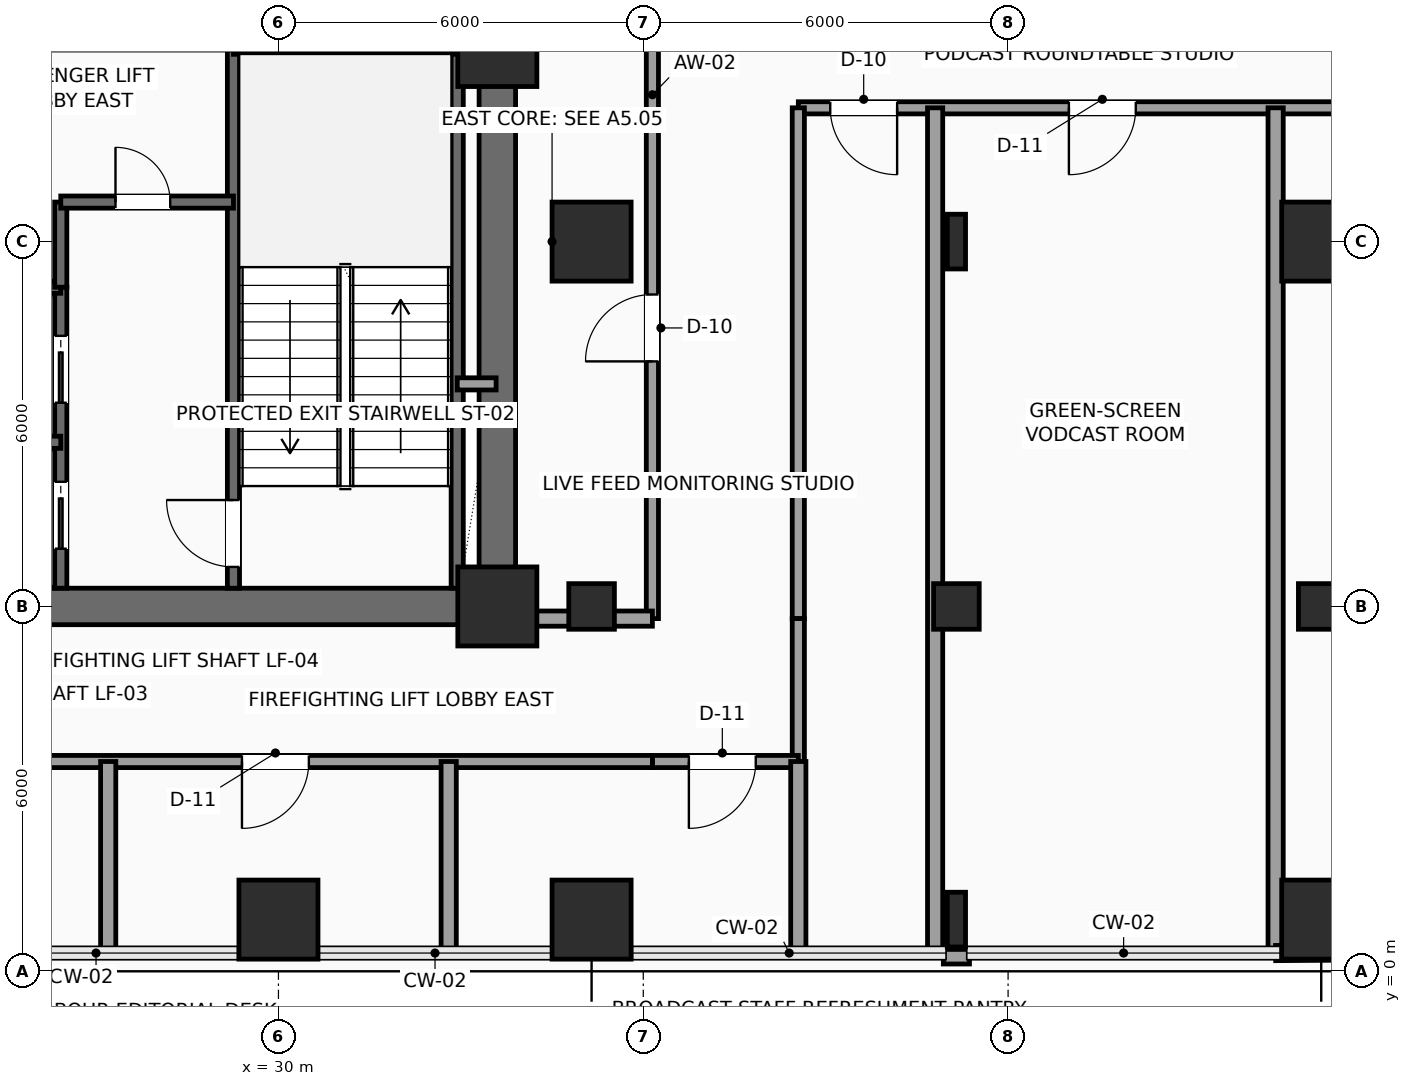
"""IFC4 building model, lengths in metres.
Left out: names, types, materials, properties, quantities, classifications, styles, units other than length and angle.
Written with IfcOpenShell. Run it as: python <this file> out.ifc"""

import sys

from ifc_helpers import new_model, si_unit, direction, frame, frame_2d, origin, origin_2d, place, context, subcontext, project, spatial, rectangle, hollow_rectangle, i_section, extrude, element, fill, save


model = new_model("IFC4")
c1 = context("Model", 3, precision=1e-05, world=origin(), true_north=direction((0.0, 1.0)))
c2 = subcontext(c1, "Body", "Model", "MODEL_VIEW")
j1 = project(units=[si_unit("LENGTHUNIT", "METRE"), si_unit("PLANEANGLEUNIT", "RADIAN")], contexts=[c1])
p1 = place(None, origin())
s1 = spatial("IfcSite", under=j1, at=p1, CompositionType="ELEMENT")
p2 = place(p1, origin())
s2 = spatial("IfcBuilding", under=s1, at=p2, CompositionType="ELEMENT")
p3 = place(p2, frame((0.0, 0.0, 83.1)))
s3 = spatial("IfcBuildingStorey", under=s2, at=p3, CompositionType="ELEMENT", Elevation=83.1)
for number, where, z_axis, x_axis in (
    (1, (33.6, 6.0, 0.0), (0.0, 0.0, 1.0), (1.0, 0.0, 0.0)),
    (2, (33.6, 15.2, 0.0), (0.0, 0.0, 1.0), (1.0, 0.0, 0.0)),
    (3, (30.0, 0.85, 0.0), (0.0, 0.0, 1.0), (1.0, 0.0, 0.0)),
    (4, (35.15, 0.85, 0.0), (0.0, 0.0, 1.0), (1.0, 0.0, 0.0)),
):
    element("IfcColumn", number, at=place(p3, frame(where, z_axis=z_axis, x_axis=x_axis)), inside=s3, PredefinedType="COLUMN", context=c2, shape_type="SweptSolid", body=[
        extrude(rectangle(XDim=1.3, YDim=1.3, at=origin_2d()), origin(), (0.0, 0.0, 1.0), 3.9),
    ])
p4 = place(p3, frame((35.15, 6.0, 0.0), z_axis=(0.0, 0.0, 1.0), x_axis=(1.0, 0.0, 0.0)))
e5 = element("IfcColumn", 5, at=p4, inside=s3, PredefinedType="COLUMN", context=c2, shape_type="SweptSolid", body=[
    extrude(hollow_rectangle(XDim=0.75, YDim=0.75, WallThickness=0.035, InnerFilletRadius=0.035, OuterFilletRadius=0.05, at=origin_2d()), origin(), (0.0, 0.0, 1.0), 3.9),
])
p5 = place(p3, frame((35.15, 12.0, 0.0), z_axis=(0.0, 0.0, 1.0), x_axis=(1.0, 0.0, 0.0)))
e6 = element("IfcColumn", 6, at=p5, inside=s3, PredefinedType="COLUMN", context=c2, shape_type="SweptSolid", body=[
    extrude(rectangle(XDim=1.3, YDim=1.3, at=origin_2d()), origin(), (0.0, 0.0, 1.0), 3.9),
])
p6 = place(p3, frame((41.15, 0.85, 0.0), z_axis=(0.0, 0.0, 1.0), x_axis=(1.0, 0.0, 0.0)))
e7 = element("IfcColumn", 7, at=p6, inside=s3, PredefinedType="COLUMN", context=c2, shape_type="SweptSolid", body=[
    extrude(i_section(OverallWidth=0.3, OverallDepth=0.9, WebThickness=0.019, FlangeThickness=0.035, FilletRadius=0.03, at=origin_2d()), origin(), (0.0, 0.0, 1.0), 3.9),
])
p7 = place(p3, frame((41.15, 6.0, 0.0), z_axis=(0.0, 0.0, 1.0), x_axis=(1.0, 0.0, 0.0)))
e8 = element("IfcColumn", 8, at=p7, inside=s3, PredefinedType="COLUMN", context=c2, shape_type="SweptSolid", body=[
    extrude(hollow_rectangle(XDim=0.75, YDim=0.75, WallThickness=0.035, InnerFilletRadius=0.035, OuterFilletRadius=0.05, at=origin_2d()), origin(), (0.0, 0.0, 1.0), 3.9),
])
p8 = place(p3, frame((41.15, 12.0, 0.0), z_axis=(0.0, 0.0, 1.0), x_axis=(1.0, 0.0, 0.0)))
e9 = element("IfcColumn", 9, at=p8, inside=s3, PredefinedType="COLUMN", context=c2, shape_type="SweptSolid", body=[
    extrude(i_section(OverallWidth=0.3, OverallDepth=0.9, WebThickness=0.019, FlangeThickness=0.035, FilletRadius=0.03, at=origin_2d()), origin(), (0.0, 0.0, 1.0), 3.9),
])
p9 = place(p3, frame((47.15, 0.85, 0.0), z_axis=(0.0, 0.0, 1.0), x_axis=(1.0, 0.0, 0.0)))
e10 = element("IfcColumn", 10, at=p9, inside=s3, PredefinedType="COLUMN", context=c2, shape_type="SweptSolid", body=[
    extrude(rectangle(XDim=1.3, YDim=1.3, at=origin_2d()), origin(), (0.0, 0.0, 1.0), 3.9),
])
p10 = place(p3, frame((47.15, 6.0, 0.0), z_axis=(0.0, 0.0, 1.0), x_axis=(1.0, 0.0, 0.0)))
e11 = element("IfcColumn", 11, at=p10, inside=s3, PredefinedType="COLUMN", context=c2, shape_type="SweptSolid", body=[
    extrude(hollow_rectangle(XDim=0.75, YDim=0.75, WallThickness=0.035, InnerFilletRadius=0.035, OuterFilletRadius=0.05, at=origin_2d()), origin(), (0.0, 0.0, 1.0), 3.9),
])
p11 = place(p3, frame((47.15, 12.0, 0.0), z_axis=(0.0, 0.0, 1.0), x_axis=(1.0, 0.0, 0.0)))
e12 = element("IfcColumn", 12, at=p11, inside=s3, PredefinedType="COLUMN", context=c2, shape_type="SweptSolid", body=[
    extrude(rectangle(XDim=1.3, YDim=1.3, at=origin_2d()), origin(), (0.0, 0.0, 1.0), 3.9),
])
p12 = place(p3, frame((41.365, 0.24, 0.0), z_axis=(0.0, 0.0, 1.0), x_axis=(-1.0, 0.0, 0.0)))
e13 = element("IfcWall", 13, at=p12, inside=s3, PredefinedType="SOLIDWALL", context=c2, shape_type="SweptSolid", body=[
    extrude(rectangle(XDim=0.43, YDim=0.24, at=frame_2d((0.215, 0.0))), origin(), (0.0, 0.0, 1.0), 3.65),
])
p13 = place(p3, frame((24.0, 6.0, 0.0), z_axis=(0.0, 0.0, 1.0), x_axis=(1.0, 0.0, 0.0)))
e14 = element("IfcWall", 14, at=p13, inside=s3, PredefinedType="SHEAR", context=c2, shape_type="SweptSolid", body=[
    extrude(rectangle(XDim=9.6, YDim=0.6, at=frame_2d((4.8, 0.0))), origin(), (0.0, 0.0, 1.0), 3.65),
])
p14 = place(p3, frame((33.6, 6.0, 0.0), z_axis=(0.0, 0.0, 1.0), x_axis=(0.0, 1.0, 0.0)))
e15 = element("IfcWall", 15, at=p14, inside=s3, PredefinedType="SHEAR", context=c2, shape_type="SweptSolid", body=[
    extrude(rectangle(XDim=12.0, YDim=0.6, at=frame_2d((6.0, 0.0))), origin(), (0.0, 0.0, 1.0), 3.65),
])
p15 = place(p14, frame((10.2, 0.0, 0.0)))
e16 = element("IfcOpeningElement", 16, at=p15, cuts=e15, PredefinedType="OPENING", context=c2, shape_type="SweptSolid", body=[
    extrude(rectangle(XDim=0.9, YDim=2.15, at=frame_2d((0.45, 1.075))), frame((0.0, 0.31, 0.0), z_axis=(0.0, -1.0, 0.0), x_axis=(1.0, 0.0, 0.0)), (0.0, 0.0, 1.0), 0.62),
])
p16 = place(p3, frame((29.26, 6.3, 0.0), z_axis=(0.0, 0.0, 1.0), x_axis=(0.0, 1.0, 0.0)))
e17 = element("IfcWall", 17, at=p16, inside=s3, PredefinedType="SHEAR", context=c2, shape_type="SweptSolid", body=[
    extrude(rectangle(XDim=8.88, YDim=0.2, at=frame_2d((4.44, 0.0))), origin(), (0.0, 0.0, 1.0), 3.65),
])
p17 = place(p16, frame((0.35, 0.0, 0.0)))
e18 = element("IfcOpeningElement", 18, at=p17, cuts=e17, PredefinedType="OPENING", context=c2, shape_type="SweptSolid", body=[
    extrude(rectangle(XDim=1.1, YDim=2.2, at=frame_2d((0.55, 1.1))), frame((0.0, 0.11, 0.0), z_axis=(0.0, -1.0, 0.0), x_axis=(1.0, 0.0, 0.0)), (0.0, 0.0, 1.0), 0.22),
])
p18 = place(p3, frame((32.94, 6.3, 0.0), z_axis=(0.0, 0.0, 1.0), x_axis=(0.0, 1.0, 0.0)))
e19 = element("IfcWall", 19, at=p18, inside=s3, PredefinedType="SHEAR", context=c2, shape_type="SweptSolid", body=[
    extrude(rectangle(XDim=8.88, YDim=0.2, at=frame_2d((4.44, 0.0))), origin(), (0.0, 0.0, 1.0), 3.65),
])
p19 = place(p3, frame((29.26, 15.18, 0.0), z_axis=(0.0, 0.0, 1.0), x_axis=(1.0, 0.0, 0.0)))
e20 = element("IfcWall", 20, at=p19, inside=s3, PredefinedType="SHEAR", context=c2, shape_type="SweptSolid", body=[
    extrude(rectangle(XDim=4.04, YDim=0.2, at=frame_2d((2.02, 0.0))), origin(), (0.0, 0.0, 1.0), 3.65),
])
p20 = place(p3, frame((26.42, 6.3, 0.0), z_axis=(0.0, 0.0, 1.0), x_axis=(0.0, 1.0, 0.0)))
e21 = element("IfcWall", 21, at=p20, inside=s3, PredefinedType="SHEAR", context=c2, shape_type="SweptSolid", body=[
    extrude(rectangle(XDim=4.95, YDim=0.2, at=frame_2d((2.475, 0.0))), origin(), (0.0, 0.0, 1.0), 3.65),
])
p21 = place(p20, frame((0.65, 0.0, 0.0)))
e22 = element("IfcOpeningElement", 22, at=p21, cuts=e21, PredefinedType="OPENING", context=c2, shape_type="SweptSolid", body=[
    extrude(rectangle(XDim=1.1, YDim=2.2, at=frame_2d((0.55, 1.1))), frame((0.0, 0.11, 0.0), z_axis=(0.0, -1.0, 0.0), x_axis=(1.0, 0.0, 0.0)), (0.0, 0.0, 1.0), 0.22),
])
p22 = place(p20, frame((3.05, 0.0, 0.0)))
e23 = element("IfcOpeningElement", 23, at=p22, cuts=e21, PredefinedType="OPENING", context=c2, shape_type="SweptSolid", body=[
    extrude(rectangle(XDim=1.1, YDim=2.2, at=frame_2d((0.55, 1.1))), frame((0.0, 0.11, 0.0), z_axis=(0.0, -1.0, 0.0), x_axis=(1.0, 0.0, 0.0)), (0.0, 0.0, 1.0), 0.22),
])
for number, where, z_axis, x_axis in (
    (24, (24.25, 8.7, 0.0), (0.0, 0.0, 1.0), (1.0, 0.0, 0.0)),
    (25, (24.25, 11.25, 0.0), (0.0, 0.0, 1.0), (1.0, 0.0, 0.0)),
):
    element("IfcWall", number, at=place(p3, frame(where, z_axis=z_axis, x_axis=x_axis)), inside=s3, PredefinedType="SHEAR", context=c2, shape_type="SweptSolid", body=[
        extrude(rectangle(XDim=2.17, YDim=0.2, at=frame_2d((1.085, 0.0))), origin(), (0.0, 0.0, 1.0), 3.65),
    ])
p23 = place(p3, frame((26.42, 11.25, 0.0), z_axis=(0.0, 0.0, 1.0), x_axis=(0.0, 1.0, 0.0)))
e26 = element("IfcWall", 26, at=p23, inside=s3, PredefinedType="SHEAR", context=c2, shape_type="SweptSolid", body=[
    extrude(rectangle(XDim=1.4, YDim=0.2, at=frame_2d((0.7, 0.0))), origin(), (0.0, 0.0, 1.0), 3.65),
])
p24 = place(p3, frame((26.42, 12.65, 0.0), z_axis=(0.0, 0.0, 1.0), x_axis=(1.0, 0.0, 0.0)))
e27 = element("IfcWall", 27, at=p24, inside=s3, PredefinedType="SHEAR", context=c2, shape_type="SweptSolid", body=[
    extrude(rectangle(XDim=2.84, YDim=0.2, at=frame_2d((1.42, 0.0))), origin(), (0.0, 0.0, 1.0), 3.65),
])
p25 = place(p24, frame((0.9, 0.0, 0.0)))
e28 = element("IfcOpeningElement", 28, at=p25, cuts=e27, PredefinedType="OPENING", context=c2, shape_type="SweptSolid", body=[
    extrude(rectangle(XDim=0.9, YDim=2.15, at=frame_2d((0.45, 1.075))), frame((0.0, 0.11, 0.0), z_axis=(0.0, -1.0, 0.0), x_axis=(1.0, 0.0, 0.0)), (0.0, 0.0, 1.0), 0.22),
])
p26 = place(p3, frame((32.94, 9.66, 0.0), z_axis=(0.0, 0.0, 1.0), x_axis=(1.0, 0.0, 0.0)))
e29 = element("IfcWall", 29, at=p26, inside=s3, PredefinedType="SOLIDWALL", context=c2, shape_type="SweptSolid", body=[
    extrude(rectangle(XDim=0.64, YDim=0.2, at=frame_2d((0.32, 0.0))), origin(), (0.0, 0.0, 1.0), 3.65),
])
p27 = place(p3, frame((36.15, 5.8, 0.0), z_axis=(0.0, 0.0, 1.0), x_axis=(0.0, 1.0, 0.0)))
e30 = element("IfcWall", 30, at=p27, inside=s3, PredefinedType="PARTITIONING", context=c2, shape_type="SweptSolid", body=[
    extrude(rectangle(XDim=10.08, YDim=0.2, at=frame_2d((5.04, 0.0))), origin(), (0.0, 0.0, 1.0), 3.65),
])
p28 = place(p27, frame((4.23, 0.0, 0.0)))
e31 = element("IfcOpeningElement", 31, at=p28, cuts=e30, PredefinedType="OPENING", context=c2, shape_type="SweptSolid", body=[
    extrude(rectangle(XDim=1.1, YDim=2.25, at=frame_2d((0.55, 1.125))), frame((0.0, 0.11, 0.0), z_axis=(0.0, -1.0, 0.0), x_axis=(1.0, 0.0, 0.0)), (0.0, 0.0, 1.0), 0.22),
])
p29 = place(p3, frame((50.9, 14.2, 0.0), z_axis=(0.0, 0.0, 1.0), x_axis=(-1.0, 0.0, 0.0)))
e32 = element("IfcWall", 32, at=p29, inside=s3, PredefinedType="PARTITIONING", context=c2, shape_type="SweptSolid", body=[
    extrude(rectangle(XDim=12.35, YDim=0.2, at=frame_2d((6.175, 0.0))), origin(), (0.0, 0.0, 1.0), 3.65),
])
p30 = place(p29, frame((10.725, 0.0, 0.0)))
e33 = element("IfcOpeningElement", 33, at=p30, cuts=e32, PredefinedType="OPENING", context=c2, shape_type="SweptSolid", body=[
    extrude(rectangle(XDim=1.1, YDim=2.25, at=frame_2d((0.55, 1.125))), frame((0.0, 0.11, 0.0), z_axis=(0.0, -1.0, 0.0), x_axis=(1.0, 0.0, 0.0)), (0.0, 0.0, 1.0), 0.22),
])
p31 = place(p29, frame((6.8, 0.0, 0.0)))
e34 = element("IfcOpeningElement", 34, at=p31, cuts=e32, PredefinedType="OPENING", context=c2, shape_type="SweptSolid", body=[
    extrude(rectangle(XDim=1.1, YDim=2.25, at=frame_2d((0.55, 1.125))), frame((0.0, 0.11, 0.0), z_axis=(0.0, -1.0, 0.0), x_axis=(1.0, 0.0, 0.0)), (0.0, 0.0, 1.0), 0.22),
])
p32 = place(p29, frame((1.75, 0.0, 0.0)))
e35 = element("IfcOpeningElement", 35, at=p32, cuts=e32, PredefinedType="OPENING", context=c2, shape_type="SweptSolid", body=[
    extrude(rectangle(XDim=1.1, YDim=2.25, at=frame_2d((0.55, 1.125))), frame((0.0, 0.11, 0.0), z_axis=(0.0, -1.0, 0.0), x_axis=(1.0, 0.0, 0.0)), (0.0, 0.0, 1.0), 0.22),
])
p33 = place(p3, frame((38.55, 14.2, 0.0), z_axis=(0.0, 0.0, 1.0), x_axis=(0.0, -1.0, 0.0)))
e36 = element("IfcWall", 36, at=p33, inside=s3, PredefinedType="PARTITIONING", context=c2, shape_type="SweptSolid", body=[
    extrude(rectangle(XDim=8.4, YDim=0.2, at=frame_2d((4.2, 0.0))), origin(), (0.0, 0.0, 1.0), 3.65),
])
p34 = place(p3, frame((38.55, 5.8, 0.0), z_axis=(0.0, 0.0, 1.0), x_axis=(0.0, -1.0, 0.0)))
e37 = element("IfcWall", 37, at=p34, inside=s3, PredefinedType="PARTITIONING", context=c2, shape_type="SweptSolid", body=[
    extrude(rectangle(XDim=2.35, YDim=0.2, at=frame_2d((1.175, 0.0))), origin(), (0.0, 0.0, 1.0), 3.65),
])
p35 = place(p3, frame((38.55, 3.45, 0.0), z_axis=(0.0, 0.0, 1.0), x_axis=(-1.0, 0.0, 0.0)))
e38 = element("IfcWall", 38, at=p35, inside=s3, PredefinedType="PARTITIONING", context=c2, shape_type="SweptSolid", body=[
    extrude(rectangle(XDim=2.4, YDim=0.2, at=frame_2d((1.2, 0.0))), origin(), (0.0, 0.0, 1.0), 3.142),
])
p36 = place(p35, frame((0.7, 0.0, 0.0)))
e39 = element("IfcOpeningElement", 39, at=p36, cuts=e38, PredefinedType="OPENING", context=c2, shape_type="SweptSolid", body=[
    extrude(rectangle(XDim=1.1, YDim=2.25, at=frame_2d((0.55, 1.125))), frame((0.0, 0.11, 0.0), z_axis=(0.0, -1.0, 0.0), x_axis=(1.0, 0.0, 0.0)), (0.0, 0.0, 1.0), 0.22),
])
p37 = place(p3, frame((36.15, 3.45, 0.0), z_axis=(0.0, 0.0, 1.0), x_axis=(-1.0, 0.0, 0.0)))
e40 = element("IfcWall", 40, at=p37, inside=s3, PredefinedType="PARTITIONING", context=c2, shape_type="SweptSolid", body=[
    extrude(rectangle(XDim=14.6, YDim=0.2, at=frame_2d((7.3, 0.0))), origin(), (0.0, 0.0, 1.0), 3.142),
])
p38 = place(p37, frame((11.275, 0.0, 0.0)))
e41 = element("IfcOpeningElement", 41, at=p38, cuts=e40, PredefinedType="OPENING", context=c2, shape_type="SweptSolid", body=[
    extrude(rectangle(XDim=1.1, YDim=2.25, at=frame_2d((0.55, 1.125))), frame((0.0, 0.11, 0.0), z_axis=(0.0, -1.0, 0.0), x_axis=(1.0, 0.0, 0.0)), (0.0, 0.0, 1.0), 0.22),
])
p39 = place(p37, frame((5.65, 0.0, 0.0)))
e42 = element("IfcOpeningElement", 42, at=p39, cuts=e40, PredefinedType="OPENING", context=c2, shape_type="SweptSolid", body=[
    extrude(rectangle(XDim=1.1, YDim=2.25, at=frame_2d((0.55, 1.125))), frame((0.0, 0.11, 0.0), z_axis=(0.0, -1.0, 0.0), x_axis=(1.0, 0.0, 0.0)), (0.0, 0.0, 1.0), 0.22),
])
p40 = place(p3, frame((40.8, 0.3, 0.0), z_axis=(0.0, 0.0, 1.0), x_axis=(0.0, 1.0, 0.0)))
e43 = element("IfcWall", 43, at=p40, inside=s3, PredefinedType="PARTITIONING", context=c2, shape_type="SweptSolid", body=[
    extrude(rectangle(XDim=13.9, YDim=0.25, at=frame_2d((6.95, 0.0))), origin(), (0.0, 0.0, 1.0), 2.992),
])
p41 = place(p3, frame((46.4, 0.3, 0.0), z_axis=(0.0, 0.0, 1.0), x_axis=(0.0, 1.0, 0.0)))
e44 = element("IfcWall", 44, at=p41, inside=s3, PredefinedType="PARTITIONING", context=c2, shape_type="SweptSolid", body=[
    extrude(rectangle(XDim=13.9, YDim=0.25, at=frame_2d((6.95, 0.0))), origin(), (0.0, 0.0, 1.0), 3.65),
])
p42 = place(p3, frame((46.4, 0.3, 0.0), z_axis=(0.0, 0.0, 1.0), x_axis=(0.999976173168, 0.006903122154, 0.0)))
e45 = element("IfcWall", 45, at=p42, inside=s3, PredefinedType="PARTITIONING", context=c2, shape_type="SweptSolid", body=[
    extrude(rectangle(XDim=7.25, YDim=0.25, at=frame_2d((3.625, 0.0))), origin(), (0.0, 0.0, 1.0), 3.65),
])
for number, where, z_axis, x_axis in (
    (46, (27.2, 0.3, 0.0), (0.0, 0.0, 1.0), (0.0, 1.0, 0.0)),
    (47, (32.8, 0.3, 0.0), (0.0, 0.0, 1.0), (0.0, 1.0, 0.0)),
    (48, (38.55, 0.3, 0.0), (0.0, 0.0, 1.0), (0.0, 1.0, 0.0)),
):
    element("IfcWall", number, at=place(p3, frame(where, z_axis=z_axis, x_axis=x_axis)), inside=s3, PredefinedType="PARTITIONING", context=c2, shape_type="SweptSolid", body=[
        extrude(rectangle(XDim=3.15, YDim=0.25, at=frame_2d((1.575, 0.0))), origin(), (0.0, 0.0, 1.0), 3.65),
    ])
p43 = place(p3, frame((33.65, 5.8, 0.0), z_axis=(0.0, 0.0, 1.0), x_axis=(1.0, 0.0, 0.0)))
e49 = element("IfcWall", 49, at=p43, inside=s3, PredefinedType="PARTITIONING", context=c2, shape_type="SweptSolid", body=[
    extrude(rectangle(XDim=2.5, YDim=0.25, at=frame_2d((1.25, 0.0))), origin(), (0.0, 0.0, 1.0), 2.992),
])
p44 = place(p17, origin())
e50 = element("IfcDoor", 50, at=p44, inside=s3, OperationType="SINGLE_SWING_RIGHT", PredefinedType="DOOR", context=c2, shape_type="SweptSolid", body=[
    extrude(rectangle(XDim=1.1, YDim=2.2, at=frame_2d((0.55, 1.1))), frame((0.0, 0.025, 0.0), z_axis=(0.0, -1.0, 0.0), x_axis=(1.0, 0.0, 0.0)), (0.0, 0.0, 1.0), 0.05),
])
fill(e18, e50)
p45 = place(p21, origin())
e51 = element("IfcDoor", 51, at=p45, inside=s3, OperationType="SLIDING_TO_LEFT", PredefinedType="DOOR", context=c2, shape_type="SweptSolid", body=[
    extrude(rectangle(XDim=1.1, YDim=2.2, at=frame_2d((0.55, 1.1))), frame((0.0, 0.025, 0.0), z_axis=(0.0, -1.0, 0.0), x_axis=(1.0, 0.0, 0.0)), (0.0, 0.0, 1.0), 0.05),
])
fill(e22, e51)
p46 = place(p22, origin())
e52 = element("IfcDoor", 52, at=p46, inside=s3, OperationType="SLIDING_TO_LEFT", PredefinedType="DOOR", context=c2, shape_type="SweptSolid", body=[
    extrude(rectangle(XDim=1.1, YDim=2.2, at=frame_2d((0.55, 1.1))), frame((0.0, 0.025, 0.0), z_axis=(0.0, -1.0, 0.0), x_axis=(1.0, 0.0, 0.0)), (0.0, 0.0, 1.0), 0.05),
])
fill(e23, e52)
p47 = place(p25, origin())
e53 = element("IfcDoor", 53, at=p47, inside=s3, OperationType="SINGLE_SWING_LEFT", PredefinedType="DOOR", context=c2, shape_type="SweptSolid", body=[
    extrude(rectangle(XDim=0.9, YDim=2.15, at=frame_2d((0.45, 1.075))), frame((0.0, 0.025, 0.0), z_axis=(0.0, -1.0, 0.0), x_axis=(1.0, 0.0, 0.0)), (0.0, 0.0, 1.0), 0.05),
])
fill(e28, e53)
p48 = place(p28, origin())
e54 = element("IfcDoor", 54, at=p48, inside=s3, OperationType="SINGLE_SWING_LEFT", PredefinedType="DOOR", context=c2, shape_type="SweptSolid", body=[
    extrude(rectangle(XDim=1.1, YDim=2.25, at=frame_2d((0.55, 1.125))), frame((0.0, 0.025, 0.0), z_axis=(0.0, -1.0, 0.0), x_axis=(1.0, 0.0, 0.0)), (0.0, 0.0, 1.0), 0.05),
])
fill(e31, e54)
p49 = place(p30, origin())
e55 = element("IfcDoor", 55, at=p49, inside=s3, OperationType="SINGLE_SWING_LEFT", PredefinedType="DOOR", context=c2, shape_type="SweptSolid", body=[
    extrude(rectangle(XDim=1.1, YDim=2.25, at=frame_2d((0.55, 1.125))), frame((0.0, 0.025, 0.0), z_axis=(0.0, -1.0, 0.0), x_axis=(1.0, 0.0, 0.0)), (0.0, 0.0, 1.0), 0.05),
])
fill(e33, e55)
p50 = place(p31, origin())
e56 = element("IfcDoor", 56, at=p50, inside=s3, OperationType="SINGLE_SWING_RIGHT", PredefinedType="DOOR", context=c2, shape_type="SweptSolid", body=[
    extrude(rectangle(XDim=1.1, YDim=2.25, at=frame_2d((0.55, 1.125))), frame((0.0, 0.025, 0.0), z_axis=(0.0, -1.0, 0.0), x_axis=(1.0, 0.0, 0.0)), (0.0, 0.0, 1.0), 0.05),
])
fill(e34, e56)
p51 = place(p36, origin())
e57 = element("IfcDoor", 57, at=p51, inside=s3, OperationType="SINGLE_SWING_RIGHT", PredefinedType="DOOR", context=c2, shape_type="SweptSolid", body=[
    extrude(rectangle(XDim=1.1, YDim=2.25, at=frame_2d((0.55, 1.125))), frame((0.0, 0.025, 0.0), z_axis=(0.0, -1.0, 0.0), x_axis=(1.0, 0.0, 0.0)), (0.0, 0.0, 1.0), 0.05),
])
fill(e39, e57)
p52 = place(p39, origin())
e58 = element("IfcDoor", 58, at=p52, inside=s3, OperationType="SINGLE_SWING_RIGHT", PredefinedType="DOOR", context=c2, shape_type="SweptSolid", body=[
    extrude(rectangle(XDim=1.1, YDim=2.25, at=frame_2d((0.55, 1.125))), frame((0.0, 0.025, 0.0), z_axis=(0.0, -1.0, 0.0), x_axis=(1.0, 0.0, 0.0)), (0.0, 0.0, 1.0), 0.05),
])
fill(e42, e58)
save(model, sys.argv[1])
